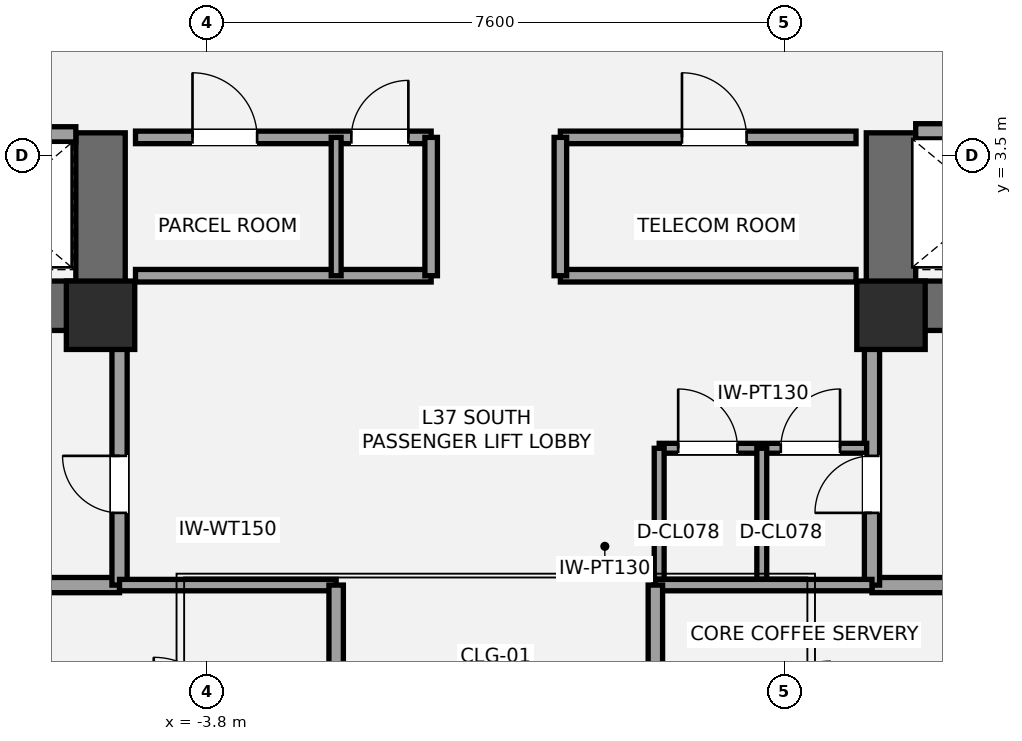
"""IFC4 building model, lengths in metres.
Left out: names, types, materials, properties, quantities, classifications, styles, units other than length and angle.
Written with IfcOpenShell. Run it as: python <this file> out.ifc"""

import sys

from ifc_helpers import new_model, si_unit, direction, frame, frame_2d, origin, origin_2d, place, context, subcontext, project, spatial, rectangle, extrude, element, fill, save


model = new_model("IFC4")
c1 = context("Model", 3, precision=1e-05, world=origin(), true_north=direction((0.0, 1.0)))
c2 = subcontext(c1, "Body", "Model", "MODEL_VIEW")
j1 = project(units=[si_unit("LENGTHUNIT", "METRE"), si_unit("PLANEANGLEUNIT", "RADIAN")], contexts=[c1])
p1 = place(None, origin())
s1 = spatial("IfcSite", under=j1, at=p1, CompositionType="ELEMENT")
p2 = place(p1, origin())
s2 = spatial("IfcBuilding", under=s1, at=p2, CompositionType="ELEMENT")
p3 = place(p2, frame((0.0, 0.0, 139.6)))
s3 = spatial("IfcBuildingStorey", under=s2, at=p3, CompositionType="ELEMENT", Elevation=139.6)
p4 = place(p3, frame((-4.875, 1.525, 0.0), z_axis=(0.0, 0.0, 1.0), x_axis=(-1.0, 0.0, 0.0)))
e1 = element("IfcWall", 1, at=p4, inside=s3, PredefinedType="SHEAR", context=c2, shape_type="SweptSolid", body=[
    extrude(rectangle(XDim=8.925, YDim=0.65, at=frame_2d((4.462, 0.0))), origin(), (0.0, 0.0, 1.0), 4.2),
])
p5 = place(p4, frame((5.425, 0.0, 0.0)))
e2 = element("IfcOpeningElement", 2, at=p5, cuts=e1, PredefinedType="OPENING", context=c2, shape_type="SweptSolid", body=[
    extrude(rectangle(XDim=1.05, YDim=2.15, at=frame_2d((0.525, 1.075))), frame((0.0, 0.335, 0.0), z_axis=(0.0, -1.0, 0.0), x_axis=(1.0, 0.0, 0.0)), (0.0, 0.0, 1.0), 0.67),
])
p6 = place(p4, frame((3.755, 0.0, 0.0)))
e3 = element("IfcOpeningElement", 3, at=p6, cuts=e1, PredefinedType="OPENING", context=c2, shape_type="SweptSolid", body=[
    extrude(rectangle(XDim=1.1, YDim=2.2, at=frame_2d((0.55, 1.1))), frame((0.0, 0.335, 0.0), z_axis=(0.0, -1.0, 0.0), x_axis=(1.0, 0.0, 0.0)), (0.0, 0.0, 1.0), 0.67),
])
p7 = place(p3, frame((-5.2, 1.2, 0.0), z_axis=(0.0, 0.0, 1.0), x_axis=(0.0, 1.0, 0.0)))
e4 = element("IfcWall", 4, at=p7, inside=s3, PredefinedType="SHEAR", context=c2, shape_type="SweptSolid", body=[
    extrude(rectangle(XDim=2.6, YDim=0.65, at=frame_2d((1.3, 0.0))), origin(), (0.0, 0.0, 1.0), 4.2),
])
p8 = place(p3, frame((13.8, 1.525, 0.0), z_axis=(0.0, 0.0, 1.0), x_axis=(-1.0, 0.0, 0.0)))
e5 = element("IfcWall", 5, at=p8, inside=s3, PredefinedType="SHEAR", context=c2, shape_type="SweptSolid", body=[
    extrude(rectangle(XDim=8.925, YDim=0.65, at=frame_2d((4.462, 0.0))), origin(), (0.0, 0.0, 1.0), 4.2),
])
p9 = place(p8, frame((2.45, 0.0, 0.0)))
e6 = element("IfcOpeningElement", 6, at=p9, cuts=e5, PredefinedType="OPENING", context=c2, shape_type="SweptSolid", body=[
    extrude(rectangle(XDim=1.05, YDim=2.15, at=frame_2d((0.525, 1.075))), frame((0.0, 0.335, 0.0), z_axis=(0.0, -1.0, 0.0), x_axis=(1.0, 0.0, 0.0)), (0.0, 0.0, 1.0), 0.67),
])
p10 = place(p8, frame((4.45, 0.0, 0.0)))
e7 = element("IfcOpeningElement", 7, at=p10, cuts=e5, PredefinedType="OPENING", context=c2, shape_type="SweptSolid", body=[
    extrude(rectangle(XDim=1.1, YDim=2.2, at=frame_2d((0.55, 1.1))), frame((0.0, 0.335, 0.0), z_axis=(0.0, -1.0, 0.0), x_axis=(1.0, 0.0, 0.0)), (0.0, 0.0, 1.0), 0.67),
])
p11 = place(p3, frame((5.2, 1.2, 0.0), z_axis=(0.0, 0.0, 1.0), x_axis=(0.0, 1.0, 0.0)))
e8 = element("IfcWall", 8, at=p11, inside=s3, PredefinedType="SHEAR", context=c2, shape_type="SweptSolid", body=[
    extrude(rectangle(XDim=2.6, YDim=0.65, at=frame_2d((1.3, 0.0))), origin(), (0.0, 0.0, 1.0), 4.2),
])
for number, where, z_axis, x_axis in (
    (9, (-5.2, 1.4, 0.0), (0.0, 0.0, 1.0), (1.0, 0.0, 0.0)),
    (10, (5.2, 1.4, 0.0), (0.0, 0.0, 1.0), (1.0, 0.0, 0.0)),
):
    element("IfcColumn", number, at=place(p3, frame(where, z_axis=z_axis, x_axis=x_axis)), inside=s3, PredefinedType="COLUMN", context=c2, shape_type="SweptSolid", body=[
        extrude(rectangle(XDim=0.9, YDim=0.9, at=origin_2d()), origin(), (0.0, 0.0, 1.0), 4.2),
    ])
p12 = place(p3, frame((-7.2, -2.15, 0.0), z_axis=(0.0, 0.0, 1.0), x_axis=(1.0, 0.0, 0.0)))
e11 = element("IfcWall", 11, at=p12, inside=s3, PredefinedType="SOLIDWALL", context=c2, shape_type="SweptSolid", body=[
    extrude(rectangle(XDim=2.25, YDim=0.2, at=frame_2d((1.125, 0.0))), origin(), (0.0, 0.0, 1.0), 4.02),
])
p13 = place(p3, frame((-4.95, -2.15, 0.0), z_axis=(0.0, 0.0, 1.0), x_axis=(0.0, 1.0, 0.0)))
e12 = element("IfcWall", 12, at=p13, inside=s3, PredefinedType="SOLIDWALL", context=c2, shape_type="SweptSolid", body=[
    extrude(rectangle(XDim=3.4, YDim=0.2, at=frame_2d((1.7, 0.0))), origin(), (0.0, 0.0, 1.0), 3.473),
])
p14 = place(p13, frame((0.95, 0.0, 0.0)))
e13 = element("IfcOpeningElement", 13, at=p14, cuts=e12, PredefinedType="OPENING", context=c2, shape_type="SweptSolid", body=[
    extrude(rectangle(XDim=0.75, YDim=2.1, at=frame_2d((0.375, 1.05))), frame((0.0, 0.11, 0.0), z_axis=(0.0, -1.0, 0.0), x_axis=(1.0, 0.0, 0.0)), (0.0, 0.0, 1.0), 0.22),
])
p15 = place(p3, frame((4.95, -2.15, 0.0), z_axis=(0.0, 0.0, 1.0), x_axis=(1.0, 0.0, 0.0)))
e14 = element("IfcWall", 14, at=p15, inside=s3, PredefinedType="SOLIDWALL", context=c2, shape_type="SweptSolid", body=[
    extrude(rectangle(XDim=2.25, YDim=0.2, at=frame_2d((1.125, 0.0))), origin(), (0.0, 0.0, 1.0), 4.02),
])
p16 = place(p3, frame((4.95, -2.15, 0.0), z_axis=(0.0, 0.0, 1.0), x_axis=(0.0, 1.0, 0.0)))
e15 = element("IfcWall", 15, at=p16, inside=s3, PredefinedType="SOLIDWALL", context=c2, shape_type="SweptSolid", body=[
    extrude(rectangle(XDim=3.4, YDim=0.2, at=frame_2d((1.7, 0.0))), origin(), (0.0, 0.0, 1.0), 3.473),
])
p17 = place(p16, frame((0.95, 0.0, 0.0)))
e16 = element("IfcOpeningElement", 16, at=p17, cuts=e15, PredefinedType="OPENING", context=c2, shape_type="SweptSolid", body=[
    extrude(rectangle(XDim=0.75, YDim=2.1, at=frame_2d((0.375, 1.05))), frame((0.0, 0.11, 0.0), z_axis=(0.0, -1.0, 0.0), x_axis=(1.0, 0.0, 0.0)), (0.0, 0.0, 1.0), 0.22),
])
p18 = place(p3, frame((2.15, -0.35, 0.0), z_axis=(0.0, 0.0, 1.0), x_axis=(1.0, 0.0, 0.0)))
e17 = element("IfcWall", 17, at=p18, inside=s3, PredefinedType="PARTITIONING", context=c2, shape_type="SweptSolid", body=[
    extrude(rectangle(XDim=2.73, YDim=0.13, at=frame_2d((1.365, 0.0))), origin(), (0.0, 0.0, 1.0), 4.02),
])
p19 = place(p18, frame((0.25, 0.0, 0.0)))
e18 = element("IfcOpeningElement", 18, at=p19, cuts=e17, PredefinedType="OPENING", context=c2, shape_type="SweptSolid", body=[
    extrude(rectangle(XDim=0.78, YDim=2.1, at=frame_2d((0.39, 1.05))), frame((0.0, 0.075, 0.0), z_axis=(0.0, -1.0, 0.0), x_axis=(1.0, 0.0, 0.0)), (0.0, 0.0, 1.0), 0.15),
])
p20 = place(p18, frame((1.6, 0.0, 0.0)))
e19 = element("IfcOpeningElement", 19, at=p20, cuts=e17, PredefinedType="OPENING", context=c2, shape_type="SweptSolid", body=[
    extrude(rectangle(XDim=0.78, YDim=2.1, at=frame_2d((0.39, 1.05))), frame((0.0, 0.075, 0.0), z_axis=(0.0, -1.0, 0.0), x_axis=(1.0, 0.0, 0.0)), (0.0, 0.0, 1.0), 0.15),
])
for number, where, z_axis, x_axis in (
    (20, (2.15, -2.15, 0.0), (0.0, 0.0, 1.0), (0.0, 1.0, 0.0)),
    (21, (3.5, -2.15, 0.0), (0.0, 0.0, 1.0), (0.0, 1.0, 0.0)),
):
    element("IfcWall", number, at=place(p3, frame(where, z_axis=z_axis, x_axis=x_axis)), inside=s3, PredefinedType="PARTITIONING", context=c2, shape_type="SweptSolid", body=[
        extrude(rectangle(XDim=1.8, YDim=0.13, at=frame_2d((0.9, 0.0))), origin(), (0.0, 0.0, 1.0), 4.02),
    ])
p21 = place(p3, frame((-9.78, 3.78, 0.0), z_axis=(0.0, 0.0, 1.0), x_axis=(1.0, 0.0, 0.0)))
e22 = element("IfcWall", 22, at=p21, inside=s3, PredefinedType="SOLIDWALL", context=c2, shape_type="SweptSolid", body=[
    extrude(rectangle(XDim=4.255, YDim=0.2, at=frame_2d((2.127, 0.0))), origin(), (0.0, 0.0, 1.0), 4.02),
])
p22 = place(p21, frame((2.72, 0.0, 0.0)))
e23 = element("IfcOpeningElement", 23, at=p22, cuts=e22, PredefinedType="OPENING", context=c2, shape_type="SweptSolid", body=[
    extrude(rectangle(XDim=1.1, YDim=2.2, at=frame_2d((0.55, 1.1))), frame((0.0, 0.11, 0.0), z_axis=(0.0, -1.0, 0.0), x_axis=(1.0, 0.0, 0.0)), (0.0, 0.0, 1.0), 0.22),
])
p23 = place(p3, frame((5.525, 3.82, 0.0), z_axis=(0.0, 0.0, 1.0), x_axis=(1.0, 0.0, 0.0)))
e24 = element("IfcWall", 24, at=p23, inside=s3, PredefinedType="SOLIDWALL", context=c2, shape_type="SweptSolid", body=[
    extrude(rectangle(XDim=4.255, YDim=0.2, at=frame_2d((2.127, 0.0))), origin(), (0.0, 0.0, 1.0), 4.02),
])
p24 = place(p23, frame((0.65, 0.0, 0.0)))
e25 = element("IfcOpeningElement", 25, at=p24, cuts=e24, PredefinedType="OPENING", context=c2, shape_type="SweptSolid", body=[
    extrude(rectangle(XDim=1.2, YDim=2.2, at=frame_2d((0.6, 1.1))), frame((0.0, 0.11, 0.0), z_axis=(0.0, -1.0, 0.0), x_axis=(1.0, 0.0, 0.0)), (0.0, 0.0, 1.0), 0.22),
])
p25 = place(p3, frame((-4.74, 1.92, 0.0), z_axis=(0.0, 0.0, 1.0), x_axis=(1.0, 0.0, 0.0)))
e26 = element("IfcWall", 26, at=p25, inside=s3, PredefinedType="PARTITIONING", context=c2, shape_type="SweptSolid", body=[
    extrude(rectangle(XDim=3.89, YDim=0.165, at=frame_2d((1.945, 0.0))), origin(), (0.0, 0.0, 1.0), 3.16),
])
p26 = place(p3, frame((-4.74, 3.74, 0.0), z_axis=(0.0, 0.0, 1.0), x_axis=(1.0, 0.0, 0.0)))
e27 = element("IfcWall", 27, at=p26, inside=s3, PredefinedType="PARTITIONING", context=c2, shape_type="SweptSolid", body=[
    extrude(rectangle(XDim=3.89, YDim=0.165, at=frame_2d((1.945, 0.0))), origin(), (0.0, 0.0, 1.0), 4.02),
])
p27 = place(p26, frame((0.75, 0.0, 0.0)))
e28 = element("IfcOpeningElement", 28, at=p27, cuts=e27, PredefinedType="OPENING", context=c2, shape_type="SweptSolid", body=[
    extrude(rectangle(XDim=0.85, YDim=2.1, at=frame_2d((0.425, 1.05))), frame((0.0, 0.093, 0.0), z_axis=(0.0, -1.0, 0.0), x_axis=(1.0, 0.0, 0.0)), (0.0, 0.0, 1.0), 0.185),
])
p28 = place(p26, frame((2.84, 0.0, 0.0)))
e29 = element("IfcOpeningElement", 29, at=p28, cuts=e27, PredefinedType="OPENING", context=c2, shape_type="SweptSolid", body=[
    extrude(rectangle(XDim=0.75, YDim=2.1, at=frame_2d((0.375, 1.05))), frame((0.0, 0.093, 0.0), z_axis=(0.0, -1.0, 0.0), x_axis=(1.0, 0.0, 0.0)), (0.0, 0.0, 1.0), 0.185),
])
p29 = place(p3, frame((-0.85, 1.92, 0.0), z_axis=(0.0, 0.0, 1.0), x_axis=(0.0, 1.0, 0.0)))
e30 = element("IfcWall", 30, at=p29, inside=s3, PredefinedType="PARTITIONING", context=c2, shape_type="SweptSolid", body=[
    extrude(rectangle(XDim=1.82, YDim=0.165, at=frame_2d((0.91, 0.0))), origin(), (0.0, 0.0, 1.0), 4.02),
])
p30 = place(p3, frame((0.85, 1.92, 0.0), z_axis=(0.0, 0.0, 1.0), x_axis=(1.0, 0.0, 0.0)))
e31 = element("IfcWall", 31, at=p30, inside=s3, PredefinedType="PARTITIONING", context=c2, shape_type="SweptSolid", body=[
    extrude(rectangle(XDim=3.89, YDim=0.165, at=frame_2d((1.945, 0.0))), origin(), (0.0, 0.0, 1.0), 3.16),
])
p31 = place(p3, frame((0.85, 3.74, 0.0), z_axis=(0.0, 0.0, 1.0), x_axis=(1.0, 0.0, 0.0)))
e32 = element("IfcWall", 32, at=p31, inside=s3, PredefinedType="PARTITIONING", context=c2, shape_type="SweptSolid", body=[
    extrude(rectangle(XDim=3.89, YDim=0.165, at=frame_2d((1.945, 0.0))), origin(), (0.0, 0.0, 1.0), 4.02),
])
p32 = place(p31, frame((1.6, 0.0, 0.0)))
e33 = element("IfcOpeningElement", 33, at=p32, cuts=e32, PredefinedType="OPENING", context=c2, shape_type="SweptSolid", body=[
    extrude(rectangle(XDim=0.85, YDim=2.1, at=frame_2d((0.425, 1.05))), frame((0.0, 0.093, 0.0), z_axis=(0.0, -1.0, 0.0), x_axis=(1.0, 0.0, 0.0)), (0.0, 0.0, 1.0), 0.185),
])
p33 = place(p3, frame((0.85, 1.92, 0.0), z_axis=(0.0, 0.0, 1.0), x_axis=(0.0, 1.0, 0.0)))
e34 = element("IfcWall", 34, at=p33, inside=s3, PredefinedType="PARTITIONING", context=c2, shape_type="SweptSolid", body=[
    extrude(rectangle(XDim=1.82, YDim=0.165, at=frame_2d((0.91, 0.0))), origin(), (0.0, 0.0, 1.0), 4.02),
])
p34 = place(p3, frame((-2.1, 1.92, 0.0), z_axis=(0.0, 0.0, 1.0), x_axis=(0.0, 1.0, 0.0)))
e35 = element("IfcWall", 35, at=p34, inside=s3, PredefinedType="PARTITIONING", context=c2, shape_type="SweptSolid", body=[
    extrude(rectangle(XDim=1.82, YDim=0.13, at=frame_2d((0.91, 0.0))), origin(), (0.0, 0.0, 1.0), 4.02),
])
p35 = place(p3, frame((-4.95, -2.15, 0.0), z_axis=(0.0, 0.0, 1.0), x_axis=(1.0, 0.0, 0.0)))
e36 = element("IfcWall", 36, at=p35, inside=s3, PredefinedType="PLUMBINGWALL", context=c2, shape_type="SweptSolid", body=[
    extrude(rectangle(XDim=2.85, YDim=0.15, at=frame_2d((1.425, 0.0))), origin(), (0.0, 0.0, 1.0), 4.02),
])
p36 = place(p3, frame((-2.1, -4.05, 0.0), z_axis=(0.0, 0.0, 1.0), x_axis=(0.0, 1.0, 0.0)))
e37 = element("IfcWall", 37, at=p36, inside=s3, PredefinedType="PLUMBINGWALL", context=c2, shape_type="SweptSolid", body=[
    extrude(rectangle(XDim=1.9, YDim=0.19, at=frame_2d((0.95, 0.0))), origin(), (0.0, 0.0, 1.0), 4.02),
])
p37 = place(p3, frame((2.1, -2.15, 0.0), z_axis=(0.0, 0.0, 1.0), x_axis=(1.0, 0.0, 0.0)))
e38 = element("IfcWall", 38, at=p37, inside=s3, PredefinedType="PLUMBINGWALL", context=c2, shape_type="SweptSolid", body=[
    extrude(rectangle(XDim=2.85, YDim=0.15, at=frame_2d((1.425, 0.0))), origin(), (0.0, 0.0, 1.0), 4.02),
])
p38 = place(p3, frame((2.1, -4.05, 0.0), z_axis=(0.0, 0.0, 1.0), x_axis=(0.0, 1.0, 0.0)))
e39 = element("IfcWall", 39, at=p38, inside=s3, PredefinedType="PLUMBINGWALL", context=c2, shape_type="SweptSolid", body=[
    extrude(rectangle(XDim=1.9, YDim=0.19, at=frame_2d((0.95, 0.0))), origin(), (0.0, 0.0, 1.0), 4.02),
])
p39 = place(p14, origin())
e40 = element("IfcDoor", 40, at=p39, inside=s3, OperationType="SINGLE_SWING_RIGHT", PredefinedType="DOOR", context=c2, shape_type="SweptSolid", body=[
    extrude(rectangle(XDim=0.75, YDim=2.1, at=frame_2d((0.375, 1.05))), frame((0.0, 0.025, 0.0), z_axis=(0.0, -1.0, 0.0), x_axis=(1.0, 0.0, 0.0)), (0.0, 0.0, 1.0), 0.05),
])
fill(e13, e40)
p40 = place(p17, origin())
e41 = element("IfcDoor", 41, at=p40, inside=s3, OperationType="SINGLE_SWING_LEFT", PredefinedType="DOOR", context=c2, shape_type="SweptSolid", body=[
    extrude(rectangle(XDim=0.75, YDim=2.1, at=frame_2d((0.375, 1.05))), frame((0.0, 0.025, 0.0), z_axis=(0.0, -1.0, 0.0), x_axis=(1.0, 0.0, 0.0)), (0.0, 0.0, 1.0), 0.05),
])
fill(e16, e41)
p41 = place(p19, origin())
e42 = element("IfcDoor", 42, at=p41, inside=s3, OperationType="SINGLE_SWING_LEFT", PredefinedType="DOOR", context=c2, shape_type="SweptSolid", body=[
    extrude(rectangle(XDim=0.78, YDim=2.1, at=frame_2d((0.39, 1.05))), frame((0.0, 0.025, 0.0), z_axis=(0.0, -1.0, 0.0), x_axis=(1.0, 0.0, 0.0)), (0.0, 0.0, 1.0), 0.05),
])
fill(e18, e42)
p42 = place(p20, origin())
e43 = element("IfcDoor", 43, at=p42, inside=s3, OperationType="SINGLE_SWING_RIGHT", PredefinedType="DOOR", context=c2, shape_type="SweptSolid", body=[
    extrude(rectangle(XDim=0.78, YDim=2.1, at=frame_2d((0.39, 1.05))), frame((0.0, 0.025, 0.0), z_axis=(0.0, -1.0, 0.0), x_axis=(1.0, 0.0, 0.0)), (0.0, 0.0, 1.0), 0.05),
])
fill(e19, e43)
p43 = place(p27, origin())
e44 = element("IfcDoor", 44, at=p43, inside=s3, OperationType="SINGLE_SWING_LEFT", PredefinedType="DOOR", context=c2, shape_type="SweptSolid", body=[
    extrude(rectangle(XDim=0.85, YDim=2.1, at=frame_2d((0.425, 1.05))), frame((0.0, 0.025, 0.0), z_axis=(0.0, -1.0, 0.0), x_axis=(1.0, 0.0, 0.0)), (0.0, 0.0, 1.0), 0.05),
])
fill(e28, e44)
p44 = place(p28, origin())
e45 = element("IfcDoor", 45, at=p44, inside=s3, OperationType="SINGLE_SWING_RIGHT", PredefinedType="DOOR", context=c2, shape_type="SweptSolid", body=[
    extrude(rectangle(XDim=0.75, YDim=2.1, at=frame_2d((0.375, 1.05))), frame((0.0, 0.025, 0.0), z_axis=(0.0, -1.0, 0.0), x_axis=(1.0, 0.0, 0.0)), (0.0, 0.0, 1.0), 0.05),
])
fill(e29, e45)
p45 = place(p32, origin())
e46 = element("IfcDoor", 46, at=p45, inside=s3, OperationType="SINGLE_SWING_LEFT", PredefinedType="DOOR", context=c2, shape_type="SweptSolid", body=[
    extrude(rectangle(XDim=0.85, YDim=2.1, at=frame_2d((0.425, 1.05))), frame((0.0, 0.025, 0.0), z_axis=(0.0, -1.0, 0.0), x_axis=(1.0, 0.0, 0.0)), (0.0, 0.0, 1.0), 0.05),
])
fill(e33, e46)
save(model, sys.argv[1])
